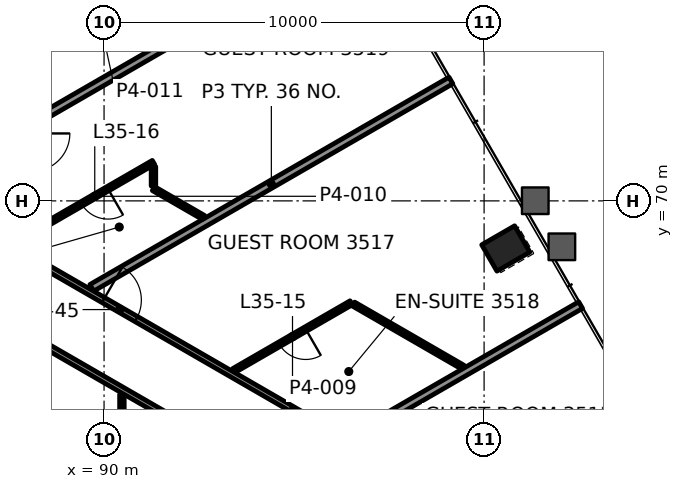
"""IFC4 building model, lengths in metres.
Left out: names, types, materials, properties, quantities, classifications, styles, units other than length and angle.
Written with IfcOpenShell. Run it as: python <this file> out.ifc"""

import sys

from ifc_helpers import new_model, si_unit, direction, frame, frame_2d, origin, origin_2d, place, context, subcontext, project, spatial, rectangle, hollow_rectangle, extrude, element, fill, save


model = new_model("IFC4")
c1 = context("Model", 3, precision=1e-05, world=origin(), true_north=direction((0.0, 1.0)))
c2 = subcontext(c1, "Body", "Model", "MODEL_VIEW")
j1 = project(units=[si_unit("LENGTHUNIT", "METRE"), si_unit("PLANEANGLEUNIT", "RADIAN")], contexts=[c1])
p1 = place(None, origin())
s1 = spatial("IfcSite", under=j1, at=p1, CompositionType="ELEMENT")
p2 = place(p1, origin())
s2 = spatial("IfcBuilding", under=s1, at=p2, CompositionType="ELEMENT")
p3 = place(p2, frame((0.0, 0.0, 155.8)))
s3 = spatial("IfcBuildingStorey", under=s2, at=p3, CompositionType="ELEMENT", Elevation=155.8)
p4 = place(p3, frame((100.571, 68.748, -0.0), z_axis=(0.0, 0.0, 1.0), x_axis=(-0.5, 0.866025403784, 0.0)))
e1 = element("IfcColumn", 1, at=p4, inside=s3, PredefinedType="COLUMN", context=c2, shape_type="SweptSolid", body=[
    extrude(hollow_rectangle(XDim=0.8, YDim=1.0, WallThickness=0.05, at=origin_2d()), origin(), (0.0, 0.0, 1.0), 3.9),
])
p5 = place(p3, frame((96.502, 63.772, 0.0), z_axis=(0.0, 0.0, 1.0), x_axis=(0.866014709899, 0.500018521895, 0.0)))
e2 = element("IfcWall", 2, at=p5, inside=s3, PredefinedType="PARTITIONING", context=c2, shape_type="SweptSolid", body=[
    extrude(rectangle(XDim=6.971, YDim=0.2, at=frame_2d((3.486, 0.0))), origin(), (0.0, 0.0, 1.0), 3.1),
])
p6 = place(p3, frame((96.504, 67.319, 0.0), z_axis=(0.0, 0.0, 1.0), x_axis=(-0.866028357664, -0.499994883695, 0.0)))
e3 = element("IfcWall", 3, at=p6, inside=s3, PredefinedType="PARTITIONING", context=c2, shape_type="SweptSolid", body=[
    extrude(rectangle(XDim=3.568, YDim=0.12, at=frame_2d((1.784, 0.0))), origin(), (0.0, 0.0, 1.0), 3.1),
])
p7 = place(p6, frame((1.384, 0.0, 0.0)))
e4 = element("IfcOpeningElement", 4, at=p7, cuts=e3, PredefinedType="OPENING", context=c2, shape_type="SweptSolid", body=[
    extrude(rectangle(XDim=0.8, YDim=2.1, at=frame_2d((0.4, 1.05))), frame((0.0, 0.07, 0.0), z_axis=(0.0, -1.0, 0.0), x_axis=(1.0, 0.0, 0.0)), (0.0, 0.0, 1.0), 0.14),
])
p8 = place(p3, frame((89.677, 67.712, 0.0), z_axis=(0.0, 0.0, 1.0), x_axis=(0.866020529357, 0.500008442661, 0.0)))
e5 = element("IfcWall", 5, at=p8, inside=s3, PredefinedType="PARTITIONING", context=c2, shape_type="SweptSolid", body=[
    extrude(rectangle(XDim=10.912, YDim=0.2, at=frame_2d((5.456, 0.0))), origin(), (0.0, 0.0, 1.0), 2.865),
])
p9 = place(p3, frame((91.3, 71.013, 0.0), z_axis=(0.0, 0.0, 1.0), x_axis=(-0.866028357664, -0.499994883695, 0.0)))
e6 = element("IfcWall", 6, at=p9, inside=s3, PredefinedType="PARTITIONING", context=c2, shape_type="SweptSolid", body=[
    extrude(rectangle(XDim=3.568, YDim=0.12, at=frame_2d((1.784, 0.0))), origin(), (0.0, 0.0, 1.0), 3.1),
])
p10 = place(p9, frame((1.384, 0.0, 0.0)))
e7 = element("IfcOpeningElement", 7, at=p10, cuts=e6, PredefinedType="OPENING", context=c2, shape_type="SweptSolid", body=[
    extrude(rectangle(XDim=0.8, YDim=2.1, at=frame_2d((0.4, 1.05))), frame((0.0, 0.07, 0.0), z_axis=(0.0, -1.0, 0.0), x_axis=(1.0, 0.0, 0.0)), (0.0, 0.0, 1.0), 0.14),
])
p11 = place(p3, frame((88.227, 72.129, 0.0), z_axis=(0.0, 0.0, 1.0), x_axis=(0.866037293988, 0.499979404997, 0.0)))
e8 = element("IfcWall", 8, at=p11, inside=s3, PredefinedType="PARTITIONING", context=c2, shape_type="SweptSolid", body=[
    extrude(rectangle(XDim=8.499, YDim=0.2, at=frame_2d((4.25, 0.0))), origin(), (0.0, 0.0, 1.0), 3.1),
])
p12 = place(p3, frame((91.3, 70.393, 0.0), z_axis=(0.0, 0.0, 1.0), x_axis=(0.0, 1.0, 0.0)))
e9 = element("IfcWall", 9, at=p12, inside=s3, PredefinedType="PARTITIONING", context=c2, shape_type="SweptSolid", body=[
    extrude(rectangle(XDim=0.511, YDim=0.12, at=frame_2d((0.256, 0.0))), origin(), (0.0, 0.0, 1.0), 3.1),
])
p13 = place(p3, frame((90.47, 61.674, 0.0), z_axis=(0.0, 0.0, 1.0), x_axis=(0.0, 1.0, 0.0)))
e10 = element("IfcWall", 10, at=p13, inside=s3, PredefinedType="PARTITIONING", context=c2, shape_type="SweptSolid", body=[
    extrude(rectangle(XDim=3.228, YDim=0.12, at=frame_2d((1.614, 0.0))), origin(), (0.0, 0.0, 1.0), 2.947),
])
p14 = place(p3, frame((99.44, 65.624, 0.0), z_axis=(0.0, 0.0, 1.0), x_axis=(-0.866054626172, 0.499949381925, 0.0)))
e11 = element("IfcWall", 11, at=p14, inside=s3, PredefinedType="PARTITIONING", context=c2, shape_type="SweptSolid", body=[
    extrude(rectangle(XDim=3.322, YDim=0.12, at=frame_2d((1.661, 0.0))), origin(), (0.0, 0.0, 1.0), 3.1),
])
p15 = place(p3, frame((92.615, 69.564, 0.0), z_axis=(0.0, 0.0, 1.0), x_axis=(-0.866078523702, 0.499907982315, 0.0)))
e12 = element("IfcWall", 12, at=p15, inside=s3, PredefinedType="PARTITIONING", context=c2, shape_type="SweptSolid", body=[
    extrude(rectangle(XDim=1.519, YDim=0.12, at=frame_2d((0.759, 0.0))), origin(), (0.0, 0.0, 1.0), 3.1),
])
p16 = place(p3, frame((88.175, 68.433, 0.0), z_axis=(0.0, 0.0, 1.0), x_axis=(0.866028999927, -0.499993771247, 0.0)))
e13 = element("IfcWall", 13, at=p16, inside=s3, PredefinedType="PARTITIONING", context=c2, shape_type="SweptSolid", body=[
    extrude(rectangle(XDim=15.708, YDim=0.15, at=frame_2d((7.854, 0.0))), origin(), (0.0, 0.0, 1.0), 3.1),
])
p17 = place(p16, frame((2.086, 0.0, 0.0)))
e14 = element("IfcOpeningElement", 14, at=p17, cuts=e13, PredefinedType="OPENING", context=c2, shape_type="SweptSolid", body=[
    extrude(rectangle(XDim=1.0, YDim=2.1, at=frame_2d((0.5, 1.05))), frame((0.0, 0.085, 0.0), z_axis=(0.0, -1.0, 0.0), x_axis=(1.0, 0.0, 0.0)), (0.0, 0.0, 1.0), 0.17),
])
p18 = place(p16, frame((10.222, 0.0, 0.0)))
e15 = element("IfcOpeningElement", 15, at=p18, cuts=e13, PredefinedType="OPENING", context=c2, shape_type="SweptSolid", body=[
    extrude(rectangle(XDim=1.0, YDim=2.1, at=frame_2d((0.5, 1.05))), frame((0.0, 0.085, 0.0), z_axis=(0.0, -1.0, 0.0), x_axis=(1.0, 0.0, 0.0)), (0.0, 0.0, 1.0), 0.17),
])
p19 = place(p3, frame((100.878, 59.02, 0.0), z_axis=(0.0, 0.0, 1.0), x_axis=(-0.866029079904, 0.49999363272, 0.0)))
e16 = element("IfcWall", 16, at=p19, inside=s3, PredefinedType="PARTITIONING", context=c2, shape_type="SweptSolid", body=[
    extrude(rectangle(XDim=14.755, YDim=0.15, at=frame_2d((7.377, 0.0))), origin(), (0.0, 0.0, 1.0), 2.947),
])
p20 = place(p19, frame((4.084, 0.0, 0.0)))
e17 = element("IfcOpeningElement", 17, at=p20, cuts=e16, PredefinedType="OPENING", context=c2, shape_type="SweptSolid", body=[
    extrude(rectangle(XDim=0.9, YDim=2.1, at=frame_2d((0.45, 1.05))), frame((0.0, 0.085, 0.0), z_axis=(0.0, -1.0, 0.0), x_axis=(1.0, 0.0, 0.0)), (0.0, 0.0, 1.0), 0.17),
])
p21 = place(p7, origin())
e18 = element("IfcDoor", 18, at=p21, inside=s3, OperationType="SINGLE_SWING_RIGHT", PredefinedType="DOOR", context=c2, shape_type="SweptSolid", body=[
    extrude(rectangle(XDim=0.8, YDim=2.1, at=frame_2d((0.4, 1.05))), frame((0.0, 0.025, 0.0), z_axis=(0.0, -1.0, 0.0), x_axis=(1.0, 0.0, 0.0)), (0.0, 0.0, 1.0), 0.05),
])
fill(e4, e18)
p22 = place(p10, origin())
e19 = element("IfcDoor", 19, at=p22, inside=s3, OperationType="SINGLE_SWING_RIGHT", PredefinedType="DOOR", context=c2, shape_type="SweptSolid", body=[
    extrude(rectangle(XDim=0.8, YDim=2.1, at=frame_2d((0.4, 1.05))), frame((0.0, 0.025, 0.0), z_axis=(0.0, -1.0, 0.0), x_axis=(1.0, 0.0, 0.0)), (0.0, 0.0, 1.0), 0.05),
])
fill(e7, e19)
p23 = place(p17, origin())
e20 = element("IfcDoor", 20, at=p23, inside=s3, OperationType="SINGLE_SWING_LEFT", PredefinedType="DOOR", context=c2, shape_type="SweptSolid", body=[
    extrude(rectangle(XDim=1.0, YDim=2.1, at=frame_2d((0.5, 1.05))), frame((0.0, 0.025, 0.0), z_axis=(0.0, -1.0, 0.0), x_axis=(1.0, 0.0, 0.0)), (0.0, 0.0, 1.0), 0.05),
])
fill(e14, e20)
p24 = place(p3, origin())
p25 = place(p24, frame((104.448, 63.983, 0.15), z_axis=(0.0, 0.0, 1.0), x_axis=(-0.5, 0.866025, 0.0)))
p26 = place(p25, origin())
e21 = element("IfcWindow", 21, at=p26, inside=s3, PartitioningType="SINGLE_PANEL", PredefinedType="WINDOW", context=c2, shape_type="SweptSolid", body=[
    extrude(rectangle(XDim=2.958, YDim=3.55, at=frame_2d((1.479, 1.775))), frame((0.0, 0.03, 0.0), z_axis=(0.0, -1.0, 0.0), x_axis=(1.0, 0.0, 0.0)), (0.0, 0.0, 1.0), 0.06),
])
save(model, sys.argv[1])
